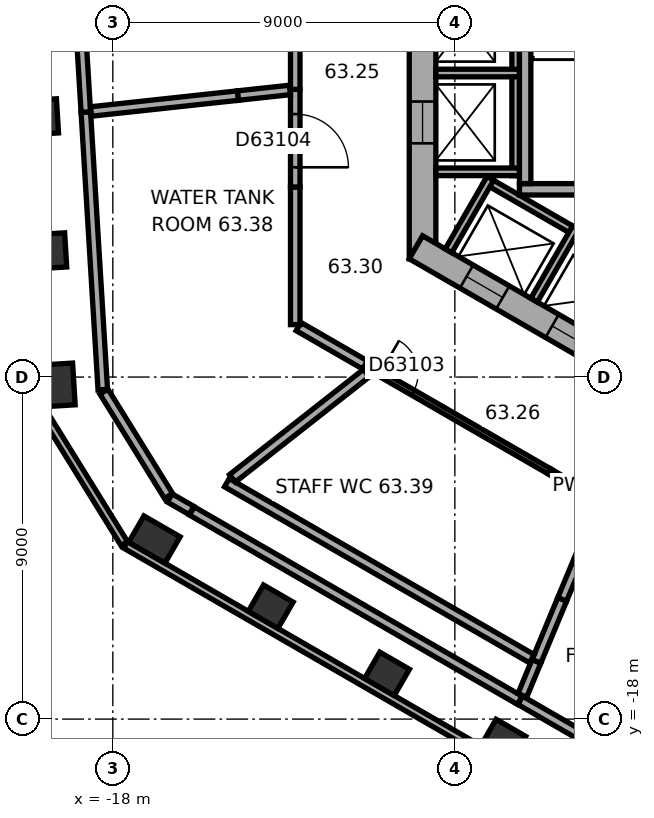
"""IFC4 building model, lengths in metres.
Left out: names, types, materials, properties, quantities, classifications, styles, units other than length and angle.
Written with IfcOpenShell. Run it as: python <this file> out.ifc"""

import sys

from ifc_helpers import new_model, si_unit, direction, frame, frame_2d, origin, origin_2d, place, context, subcontext, project, spatial, rectangle, extrude, element, fill, save


model = new_model("IFC4")
c1 = context("Model", 3, precision=1e-05, world=origin(), true_north=direction((0.0, 1.0)))
c2 = subcontext(c1, "Body", "Model", "MODEL_VIEW")
j1 = project(units=[si_unit("LENGTHUNIT", "METRE"), si_unit("PLANEANGLEUNIT", "RADIAN")], contexts=[c1])
p1 = place(None, origin())
s1 = spatial("IfcSite", under=j1, at=p1, CompositionType="ELEMENT")
p2 = place(p1, origin())
s2 = spatial("IfcBuilding", under=s1, at=p2, CompositionType="ELEMENT")
p3 = place(p2, frame((0.0, 0.0, 255.0)))
s3 = spatial("IfcBuildingStorey", under=s2, at=p3, CompositionType="ELEMENT", Elevation=255.0)
for number, where, z_axis, x_axis in (
    (1, (-19.856, -2.152, 0.0), (0.0, 0.0, 1.0), (0.061, -0.998, 0.0)),
    (2, (-19.64, -5.679, 0.0), (0.0, 0.0, 1.0), (0.061, -0.998, 0.0)),
):
    element("IfcColumn", number, at=place(p3, frame(where, z_axis=z_axis, x_axis=x_axis)), inside=s3, PredefinedType="COLUMN", context=c2, shape_type="SweptSolid", body=[
        extrude(rectangle(XDim=0.9, YDim=0.8, at=origin_2d()), origin(), (0.0, 0.0, 1.0), 4.8),
    ])
for number, where, z_axis, x_axis in (
    (3, (-19.424, -9.206, 0.0), (0.0, 0.0, 1.0), (0.061, -0.998, 0.0)),
    (4, (-16.906, -13.276, 0.0), (0.0, 0.0, 1.0), (0.866, -0.5, 0.0)),
):
    element("IfcColumn", number, at=place(p3, frame(where, z_axis=z_axis, x_axis=x_axis)), inside=s3, PredefinedType="COLUMN", context=c2, shape_type="SweptSolid", body=[
        extrude(rectangle(XDim=1.1, YDim=0.8, at=origin_2d()), origin(), (0.0, 0.0, 1.0), 4.8),
    ])
for number, where, z_axis, x_axis in (
    (5, (-13.845, -15.042, 0.0), (0.0, 0.0, 1.0), (0.866, -0.5, 0.0)),
    (6, (-10.785, -16.809, 0.0), (0.0, 0.0, 1.0), (0.866, -0.5, 0.0)),
    (7, (-7.725, -18.576, 0.0), (0.0, 0.0, 1.0), (0.866, -0.5, 0.0)),
):
    element("IfcColumn", number, at=place(p3, frame(where, z_axis=z_axis, x_axis=x_axis)), inside=s3, PredefinedType="COLUMN", context=c2, shape_type="SweptSolid", body=[
        extrude(rectangle(XDim=0.9, YDim=0.8, at=origin_2d()), origin(), (0.0, 0.0, 1.0), 4.8),
    ])
p4 = place(p3, frame((-9.85, 5.889, 0.0), z_axis=(0.0, 0.0, 1.0), x_axis=(0.0, -1.0, 0.0)))
e8 = element("IfcWall", 8, at=p4, inside=s3, PredefinedType="SHEAR", context=c2, shape_type="SweptSolid", body=[
    extrude(rectangle(XDim=11.778, YDim=0.7, at=frame_2d((5.889, 0.0))), origin(), (0.0, 0.0, 1.0), 4.8),
])
p5 = place(p4, frame((5.039, 0.0, 0.0)))
e9 = element("IfcOpeningElement", 9, at=p5, cuts=e8, PredefinedType="OPENING", context=c2, shape_type="SweptSolid", body=[
    extrude(rectangle(XDim=1.1, YDim=2.1, at=frame_2d((0.55, 1.05))), frame((0.0, 0.36, 0.0), z_axis=(0.0, -1.0, 0.0), x_axis=(1.0, 0.0, 0.0)), (0.0, 0.0, 1.0), 0.72),
])
p6 = place(p4, frame((7.639, 0.0, 0.0)))
e10 = element("IfcOpeningElement", 10, at=p6, cuts=e8, PredefinedType="OPENING", context=c2, shape_type="SweptSolid", body=[
    extrude(rectangle(XDim=1.1, YDim=2.1, at=frame_2d((0.55, 1.05))), frame((0.0, 0.36, 0.0), z_axis=(0.0, -1.0, 0.0), x_axis=(1.0, 0.0, 0.0)), (0.0, 0.0, 1.0), 0.72),
])
p7 = place(p3, frame((-10.025, -5.586, 0.0), z_axis=(0.0, 0.0, 1.0), x_axis=(0.866026453023, -0.499998182661, 0.0)))
e11 = element("IfcWall", 11, at=p7, inside=s3, PredefinedType="SHEAR", context=c2, shape_type="SweptSolid", body=[
    extrude(rectangle(XDim=11.778, YDim=0.7, at=frame_2d((5.889, 0.0))), origin(), (0.0, 0.0, 1.0), 4.8),
])
p8 = place(p7, frame((6.089, 0.0, 0.0)))
e12 = element("IfcOpeningElement", 12, at=p8, cuts=e11, PredefinedType="OPENING", context=c2, shape_type="SweptSolid", body=[
    extrude(rectangle(XDim=1.5, YDim=2.1, at=frame_2d((0.75, 1.05))), frame((0.0, 0.36, 0.0), z_axis=(0.0, -1.0, 0.0), x_axis=(1.0, 0.0, 0.0)), (0.0, 0.0, 1.0), 0.72),
])
p9 = place(p7, frame((1.539, 0.0, 0.0)))
e13 = element("IfcOpeningElement", 13, at=p9, cuts=e11, PredefinedType="OPENING", context=c2, shape_type="SweptSolid", body=[
    extrude(rectangle(XDim=1.1, YDim=2.1, at=frame_2d((0.55, 1.05))), frame((0.0, 0.36, 0.0), z_axis=(0.0, -1.0, 0.0), x_axis=(1.0, 0.0, 0.0)), (0.0, 0.0, 1.0), 0.72),
])
p10 = place(p7, frame((4.139, 0.0, 0.0)))
e14 = element("IfcOpeningElement", 14, at=p10, cuts=e11, PredefinedType="OPENING", context=c2, shape_type="SweptSolid", body=[
    extrude(rectangle(XDim=1.1, YDim=2.1, at=frame_2d((0.55, 1.05))), frame((0.0, 0.36, 0.0), z_axis=(0.0, -1.0, 0.0), x_axis=(1.0, 0.0, 0.0)), (0.0, 0.0, 1.0), 0.72),
])
p11 = place(p3, frame((-19.873, -9.869, 0.0), z_axis=(0.0, 0.0, 1.0), x_axis=(0.52626914263, -0.850318051975, 0.0)))
e15 = element("IfcWall", 15, at=p11, inside=s3, PredefinedType="STANDARD", context=c2, shape_type="SweptSolid", body=[
    extrude(rectangle(XDim=4.13, YDim=0.2, at=frame_2d((2.065, 0.0))), origin(), (0.0, 0.0, 1.0), 4.8),
])
p12 = place(p3, frame((-17.664, -13.415, 0.0), z_axis=(0.0, 0.0, 1.0), x_axis=(0.866026555358, -0.49999800541, 0.0)))
e16 = element("IfcWall", 16, at=p12, inside=s3, PredefinedType="STANDARD", context=c2, shape_type="SweptSolid", body=[
    extrude(rectangle(XDim=18.841, YDim=0.2, at=frame_2d((9.421, 0.0))), origin(), (0.0, 0.0, 1.0), 4.8),
])
p13 = place(p3, frame((-7.4, 4.3, 0.0), z_axis=(0.0, 0.0, 1.0), x_axis=(0.0, -1.0, 0.0)))
e17 = element("IfcWall", 17, at=p13, inside=s3, PredefinedType="PARTITIONING", context=c2, shape_type="SweptSolid", body=[
    extrude(rectangle(XDim=8.0, YDim=0.2, at=frame_2d((4.0, 0.0))), origin(), (0.0, 0.0, 1.0), 4.52),
])
for number, where, z_axis, x_axis in (
    (18, (-7.3, -1.0, 0.0), (0.0, 0.0, 1.0), (-1.0, 0.0, 0.0)),
    (19, (-7.3, -3.6, 0.0), (0.0, 0.0, 1.0), (-1.0, 0.0, 0.0)),
):
    element("IfcWall", number, at=place(p3, frame(where, z_axis=z_axis, x_axis=x_axis)), inside=s3, PredefinedType="PARTITIONING", context=c2, shape_type="SweptSolid", body=[
        extrude(rectangle(XDim=2.2, YDim=0.2, at=frame_2d((1.1, 0.0))), origin(), (0.0, 0.0, 1.0), 4.52),
    ])
p14 = place(p3, frame((-8.203, -3.809, 0.0), z_axis=(0.0, 0.0, 1.0), x_axis=(0.866028230842, -0.499995103361, 0.0)))
e20 = element("IfcWall", 20, at=p14, inside=s3, PredefinedType="PARTITIONING", context=c2, shape_type="SweptSolid", body=[
    extrude(rectangle(XDim=5.4, YDim=0.2, at=frame_2d((2.7, 0.0))), origin(), (0.0, 0.0, 1.0), 4.52),
])
for number, where, z_axis, x_axis in (
    (21, (-8.067, -3.772, 0.0), (0.0, 0.0, 1.0), (-0.5, -0.866, 0.0)),
    (22, (-5.815, -5.072, 0.0), (0.0, 0.0, 1.0), (-0.5, -0.866, 0.0)),
):
    element("IfcWall", number, at=place(p3, frame(where, z_axis=z_axis, x_axis=x_axis)), inside=s3, PredefinedType="PARTITIONING", context=c2, shape_type="SweptSolid", body=[
        extrude(rectangle(XDim=2.2, YDim=0.2, at=frame_2d((1.1, 0.0))), origin(), (0.0, 0.0, 1.0), 4.52),
    ])
p15 = place(p3, frame((-2.6, -4.06, 0.0), z_axis=(0.0, 0.0, 1.0), x_axis=(-1.0, 0.0, 0.0)))
e23 = element("IfcWall", 23, at=p15, inside=s3, PredefinedType="SHEAR", context=c2, shape_type="SweptSolid", body=[
    extrude(rectangle(XDim=4.7, YDim=0.3, at=frame_2d((2.35, 0.0))), origin(), (0.0, 0.0, 1.0), 4.52),
])
p16 = place(p3, frame((-7.15, 3.15, 0.0), z_axis=(0.0, 0.0, 1.0), x_axis=(0.0, -1.0, 0.0)))
e24 = element("IfcWall", 24, at=p16, inside=s3, PredefinedType="SHEAR", context=c2, shape_type="SweptSolid", body=[
    extrude(rectangle(XDim=7.06, YDim=0.3, at=frame_2d((3.53, 0.0))), origin(), (0.0, 0.0, 1.0), 4.52),
])
p17 = place(p3, frame((-1.517, -20.833, 0.0), z_axis=(0.0, 0.0, 1.0), x_axis=(-0.866015126836, 0.500017799774, 0.0)))
e25 = element("IfcWall", 25, at=p17, inside=s3, PredefinedType="SOLIDWALL", context=c2, shape_type="SweptSolid", body=[
    extrude(rectangle(XDim=6.655, YDim=0.25, at=frame_2d((3.327, 0.0))), origin(), (0.0, 0.0, 1.0), 4.02),
])
p18 = place(p3, frame((-7.292, -17.504, 0.0), z_axis=(0.0, 0.0, 1.0), x_axis=(-0.866024002353, 0.500002427343, 0.0)))
e26 = element("IfcWall", 26, at=p18, inside=s3, PredefinedType="SOLIDWALL", context=c2, shape_type="SweptSolid", body=[
    extrude(rectangle(XDim=9.964, YDim=0.25, at=frame_2d((4.982, 0.0))), origin(), (0.0, 0.0, 1.0), 4.02),
])
p19 = place(p3, frame((-7.223, -17.375, 0.0), z_axis=(0.0, 0.0, 1.0), x_axis=(0.382374085118, 0.924007607669, 0.0)))
e27 = element("IfcWall", 27, at=p19, inside=s3, PredefinedType="SOLIDWALL", context=c2, shape_type="SweptSolid", body=[
    extrude(rectangle(XDim=0.967, YDim=0.25, at=frame_2d((0.484, 0.0))), origin(), (0.0, 0.0, 1.0), 3.6),
])
p20 = place(p3, frame((-6.853, -16.479, 0.0), z_axis=(0.0, 0.0, 1.0), x_axis=(0.38378052161, 0.923424339745, 0.0)))
e28 = element("IfcWall", 28, at=p20, inside=s3, PredefinedType="SOLIDWALL", context=c2, shape_type="SweptSolid", body=[
    extrude(rectangle(XDim=1.765, YDim=0.25, at=frame_2d((0.883, 0.0))), origin(), (0.0, 0.0, 1.0), 3.6),
])
p21 = place(p3, frame((-6.975, -16.411, 0.0), z_axis=(0.0, 0.0, 1.0), x_axis=(-0.866045613381, 0.499964994319, 0.0)))
e29 = element("IfcWall", 29, at=p21, inside=s3, PredefinedType="SOLIDWALL", context=c2, shape_type="SweptSolid", body=[
    extrude(rectangle(XDim=9.265, YDim=0.25, at=frame_2d((4.633, 0.0))), origin(), (0.0, 0.0, 1.0), 4.52),
])
p22 = place(p3, frame((-6.175, -14.848, 0.0), z_axis=(0.0, 0.0, 1.0), x_axis=(0.383969284398, 0.923345866205, 0.0)))
e30 = element("IfcWall", 30, at=p22, inside=s3, PredefinedType="SOLIDWALL", context=c2, shape_type="SweptSolid", body=[
    extrude(rectangle(XDim=2.63, YDim=0.25, at=frame_2d((1.315, 0.0))), origin(), (0.0, 0.0, 1.0), 3.6),
])
p23 = place(p3, frame((-15.931, -12.51, 0.0), z_axis=(0.0, 0.0, 1.0), x_axis=(-0.865907869998, 0.500203519255, 0.0)))
e31 = element("IfcWall", 31, at=p23, inside=s3, PredefinedType="SOLIDWALL", context=c2, shape_type="SweptSolid", body=[
    extrude(rectangle(XDim=0.659, YDim=0.25, at=frame_2d((0.33, 0.0))), origin(), (0.0, 0.0, 1.0), 4.52),
])
p24 = place(p3, frame((-16.533, -12.13, 0.0), z_axis=(0.0, 0.0, 1.0), x_axis=(-0.526318183269, 0.850287698347, 0.0)))
e32 = element("IfcWall", 32, at=p24, inside=s3, PredefinedType="SOLIDWALL", context=c2, shape_type="SweptSolid", body=[
    extrude(rectangle(XDim=3.23, YDim=0.25, at=frame_2d((1.615, 0.0))), origin(), (0.0, 0.0, 1.0), 4.52),
])
p25 = place(p3, frame((-14.853, -11.666, 0.0), z_axis=(0.0, 0.0, 1.0), x_axis=(0.786320228008, 0.617819147506, 0.0)))
e33 = element("IfcWall", 33, at=p25, inside=s3, PredefinedType="SOLIDWALL", context=c2, shape_type="SweptSolid", body=[
    extrude(rectangle(XDim=4.484, YDim=0.25, at=frame_2d((2.242, 0.0))), origin(), (0.0, 0.0, 1.0), 3.6),
])
p26 = place(p3, frame((-6.513, -11.481, 0.0), z_axis=(0.0, 0.0, 1.0), x_axis=(0.866009279501, -0.500027927039, 0.0)))
e34 = element("IfcWall", 34, at=p26, inside=s3, PredefinedType="PARTITIONING", context=c2, shape_type="SweptSolid", body=[
    extrude(rectangle(XDim=1.499, YDim=0.15, at=frame_2d((0.75, 0.0))), origin(), (0.0, 0.0, 1.0), 4.52),
])
p27 = place(p3, frame((-18.264, -9.333, 0.0), z_axis=(0.0, 0.0, 1.0), x_axis=(-0.061013750774, 0.998136925585, 0.0)))
e35 = element("IfcWall", 35, at=p27, inside=s3, PredefinedType="SOLIDWALL", context=c2, shape_type="SweptSolid", body=[
    extrude(rectangle(XDim=7.319, YDim=0.25, at=frame_2d((3.659, 0.0))), origin(), (0.0, 0.0, 1.0), 4.02),
])
p28 = place(p3, frame((-11.186, -8.784, 0.0), z_axis=(0.0, 0.0, 1.0), x_axis=(0.866020546064, -0.500008413725, 0.0)))
e36 = element("IfcWall", 36, at=p28, inside=s3, PredefinedType="PARTITIONING", context=c2, shape_type="SweptSolid", body=[
    extrude(rectangle(XDim=5.395, YDim=0.15, at=frame_2d((2.698, 0.0))), origin(), (0.0, 0.0, 1.0), 4.52),
])
p29 = place(p28, frame((0.25, 0.0, 0.0)))
e37 = element("IfcOpeningElement", 37, at=p29, cuts=e36, PredefinedType="OPENING", context=c2, shape_type="SweptSolid", body=[
    extrude(rectangle(XDim=1.0, YDim=2.1, at=frame_2d((0.5, 1.05))), frame((0.0, 0.085, 0.0), z_axis=(0.0, -1.0, 0.0), x_axis=(1.0, 0.0, 0.0)), (0.0, 0.0, 1.0), 0.17),
])
p30 = place(p3, frame((-11.363, -8.681, 0.0), z_axis=(0.0, 0.0, 1.0), x_axis=(0.865888002441, -0.500237910626, 0.0)))
e38 = element("IfcWall", 38, at=p30, inside=s3, PredefinedType="SOLIDWALL", context=c2, shape_type="SweptSolid", body=[
    extrude(rectangle(XDim=0.205, YDim=0.25, at=frame_2d((0.103, 0.0))), origin(), (0.0, 0.0, 1.0), 4.52),
])
p31 = place(p3, frame((-13.113, -7.671, 0.0), z_axis=(0.0, 0.0, 1.0), x_axis=(0.866026663364, -0.499997818338, 0.0)))
e39 = element("IfcWall", 39, at=p31, inside=s3, PredefinedType="SOLIDWALL", context=c2, shape_type="SweptSolid", body=[
    extrude(rectangle(XDim=2.021, YDim=0.25, at=frame_2d((1.01, 0.0))), origin(), (0.0, 0.0, 1.0), 4.52),
])
p32 = place(p3, frame((-13.2, -7.621, 0.0), z_axis=(0.0, 0.0, 1.0), x_axis=(0.0, 1.0, 0.0)))
e40 = element("IfcWall", 40, at=p32, inside=s3, PredefinedType="SOLIDWALL", context=c2, shape_type="SweptSolid", body=[
    extrude(rectangle(XDim=3.621, YDim=0.25, at=frame_2d((1.811, 0.0))), origin(), (0.0, 0.0, 1.0), 4.52),
])
p33 = place(p3, frame((-13.2, -4.0, 0.0), z_axis=(0.0, 0.0, 1.0), x_axis=(0.0, 1.0, 0.0)))
e41 = element("IfcWall", 41, at=p33, inside=s3, PredefinedType="SOLIDWALL", context=c2, shape_type="SweptSolid", body=[
    extrude(rectangle(XDim=2.57, YDim=0.25, at=frame_2d((1.285, 0.0))), origin(), (0.0, 0.0, 1.0), 4.52),
])
p34 = place(p33, frame((0.52, 0.0, 0.0)))
e42 = element("IfcOpeningElement", 42, at=p34, cuts=e41, PredefinedType="OPENING", context=c2, shape_type="SweptSolid", body=[
    extrude(rectangle(XDim=1.4, YDim=2.1, at=frame_2d((0.7, 1.05))), frame((0.0, 0.135, 0.0), z_axis=(0.0, -1.0, 0.0), x_axis=(1.0, 0.0, 0.0)), (0.0, 0.0, 1.0), 0.27),
])
p35 = place(p3, frame((-18.711, -2.028, 0.0), z_axis=(0.0, 0.0, 1.0), x_axis=(-0.061055377069, 0.998134380197, 0.0)))
e43 = element("IfcWall", 43, at=p35, inside=s3, PredefinedType="SOLIDWALL", context=c2, shape_type="SweptSolid", body=[
    extrude(rectangle(XDim=9.985, YDim=0.25, at=frame_2d((4.992, 0.0))), origin(), (0.0, 0.0, 1.0), 4.02),
])
p36 = place(p3, frame((-14.707, -1.594, 0.0), z_axis=(0.0, 0.0, 1.0), x_axis=(-0.994177266682, -0.107756959931, 0.0)))
e44 = element("IfcWall", 44, at=p36, inside=s3, PredefinedType="SOLIDWALL", context=c2, shape_type="SweptSolid", body=[
    extrude(rectangle(XDim=3.888, YDim=0.25, at=frame_2d((1.944, 0.0))), origin(), (0.0, 0.0, 1.0), 3.6),
])
p37 = place(p3, frame((-14.707, -1.594, 0.0), z_axis=(0.0, 0.0, 1.0), x_axis=(0.994197816276, 0.107567198119, 0.0)))
e45 = element("IfcWall", 45, at=p37, inside=s3, PredefinedType="SOLIDWALL", context=c2, shape_type="SweptSolid", body=[
    extrude(rectangle(XDim=1.375, YDim=0.25, at=frame_2d((0.688, 0.0))), origin(), (0.0, 0.0, 1.0), 3.6),
])
p38 = place(p3, frame((-13.2, -1.43, 0.0), z_axis=(0.0, 0.0, 1.0), x_axis=(0.0, 1.0, 0.0)))
e46 = element("IfcWall", 46, at=p38, inside=s3, PredefinedType="SOLIDWALL", context=c2, shape_type="SweptSolid", body=[
    extrude(rectangle(XDim=3.43, YDim=0.25, at=frame_2d((1.715, 0.0))), origin(), (0.0, 0.0, 1.0), 4.52),
])
p39 = place(p6, origin())
e47 = element("IfcDoor", 47, at=p39, inside=s3, OperationType="DOUBLE_DOOR_SLIDING", PredefinedType="DOOR", context=c2, shape_type="SweptSolid", body=[
    extrude(rectangle(XDim=1.1, YDim=2.1, at=frame_2d((0.55, 1.05))), frame((0.0, 0.025, 0.0), z_axis=(0.0, -1.0, 0.0), x_axis=(1.0, 0.0, 0.0)), (0.0, 0.0, 1.0), 0.05),
])
fill(e10, e47)
p40 = place(p9, origin())
e48 = element("IfcDoor", 48, at=p40, inside=s3, OperationType="DOUBLE_DOOR_SLIDING", PredefinedType="DOOR", context=c2, shape_type="SweptSolid", body=[
    extrude(rectangle(XDim=1.1, YDim=2.1, at=frame_2d((0.55, 1.05))), frame((0.0, 0.025, 0.0), z_axis=(0.0, -1.0, 0.0), x_axis=(1.0, 0.0, 0.0)), (0.0, 0.0, 1.0), 0.05),
])
fill(e13, e48)
p41 = place(p10, origin())
e49 = element("IfcDoor", 49, at=p41, inside=s3, OperationType="DOUBLE_DOOR_SLIDING", PredefinedType="DOOR", context=c2, shape_type="SweptSolid", body=[
    extrude(rectangle(XDim=1.1, YDim=2.1, at=frame_2d((0.55, 1.05))), frame((0.0, 0.025, 0.0), z_axis=(0.0, -1.0, 0.0), x_axis=(1.0, 0.0, 0.0)), (0.0, 0.0, 1.0), 0.05),
])
fill(e14, e49)
p42 = place(p29, origin())
e50 = element("IfcDoor", 50, at=p42, inside=s3, OperationType="SINGLE_SWING_LEFT", PredefinedType="DOOR", context=c2, shape_type="SweptSolid", body=[
    extrude(rectangle(XDim=1.0, YDim=2.1, at=frame_2d((0.5, 1.05))), frame((0.0, 0.025, 0.0), z_axis=(0.0, -1.0, 0.0), x_axis=(1.0, 0.0, 0.0)), (0.0, 0.0, 1.0), 0.05),
])
fill(e37, e50)
p43 = place(p34, origin())
e51 = element("IfcDoor", 51, at=p43, inside=s3, OperationType="SINGLE_SWING_LEFT", PredefinedType="DOOR", context=c2, shape_type="SweptSolid", body=[
    extrude(rectangle(XDim=1.4, YDim=2.1, at=frame_2d((0.7, 1.05))), frame((0.0, 0.025, 0.0), z_axis=(0.0, -1.0, 0.0), x_axis=(1.0, 0.0, 0.0)), (0.0, 0.0, 1.0), 0.05),
])
fill(e42, e51)
save(model, sys.argv[1])
